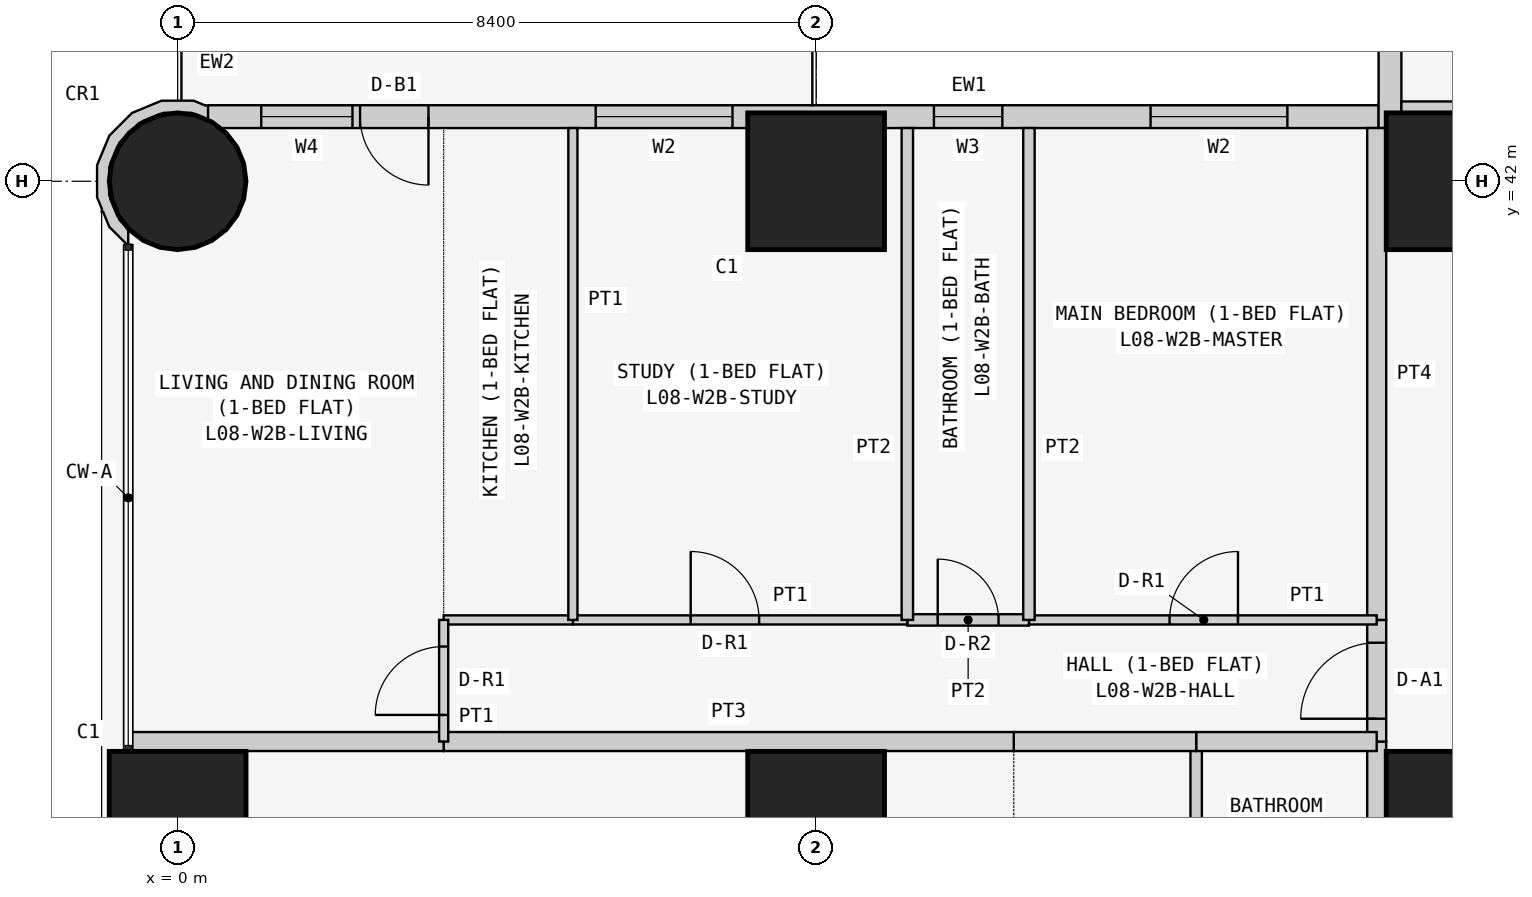
"""IFC4 building model, lengths in metres.
Left out: names, types, materials, properties, quantities, classifications, styles, units other than length and angle.
Written with IfcOpenShell. Run it as: python <this file> out.ifc"""

import sys

from ifc_helpers import new_model, si_unit, direction, frame, frame_2d, origin, origin_2d, place, context, subcontext, project, spatial, polyline, rectangle, circle, outline, extrude, element, fill, save


model = new_model("IFC4")
c1 = context("Model", 3, precision=1e-05, world=origin(), true_north=direction((0.0, 1.0)))
c2 = subcontext(c1, "Body", "Model", "MODEL_VIEW")
j1 = project(units=[si_unit("LENGTHUNIT", "METRE"), si_unit("PLANEANGLEUNIT", "RADIAN")], contexts=[c1])
p1 = place(None, origin())
s1 = spatial("IfcSite", under=j1, at=p1, CompositionType="ELEMENT")
p2 = place(p1, origin())
s2 = spatial("IfcBuilding", under=s1, at=p2, CompositionType="ELEMENT")
p3 = place(p2, frame((0.0, 0.0, 38.1)))
s3 = spatial("IfcBuildingStorey", under=s2, at=p3, CompositionType="ELEMENT", Elevation=38.1)
p4 = place(p3, frame((0.0, 33.6, 0.0), z_axis=(0.0, 0.0, 1.0), x_axis=(1.0, 0.0, 0.0)))
e1 = element("IfcColumn", 1, at=p4, inside=s3, PredefinedType="COLUMN", context=c2, shape_type="SweptSolid", body=[
    extrude(rectangle(XDim=1.8, YDim=1.8, at=origin_2d()), origin(), (0.0, 0.0, 1.0), 3.6),
])
p5 = place(p3, frame((0.0, 42.0, 0.0), z_axis=(0.0, 0.0, 1.0), x_axis=(1.0, 0.0, 0.0)))
e2 = element("IfcColumn", 2, at=p5, inside=s3, PredefinedType="COLUMN", context=c2, shape_type="SweptSolid", body=[
    extrude(circle(Radius=0.9, at=origin_2d()), origin(), (0.0, 0.0, 1.0), 3.6),
])
for number, where, z_axis, x_axis in (
    (3, (8.4, 33.6, 0.0), (0.0, 0.0, 1.0), (1.0, 0.0, 0.0)),
    (4, (8.4, 42.0, 0.0), (0.0, 0.0, 1.0), (1.0, 0.0, 0.0)),
    (5, (16.8, 33.6, 0.0), (0.0, 0.0, 1.0), (1.0, 0.0, 0.0)),
    (6, (16.8, 42.0, 0.0), (0.0, 0.0, 1.0), (1.0, 0.0, 0.0)),
):
    element("IfcColumn", number, at=place(p3, frame(where, z_axis=z_axis, x_axis=x_axis)), inside=s3, PredefinedType="COLUMN", context=c2, shape_type="SweptSolid", body=[
        extrude(rectangle(XDim=1.8, YDim=1.8, at=origin_2d()), origin(), (0.0, 0.0, 1.0), 3.6),
    ])
p6 = place(p3, frame((15.8, 42.85, 0.0), z_axis=(0.0, 0.0, 1.0), x_axis=(-1.0, 0.0, 0.0)))
e7 = element("IfcWall", 7, at=p6, inside=s3, PredefinedType="SOLIDWALL", context=c2, shape_type="SweptSolid", body=[
    extrude(rectangle(XDim=15.4, YDim=0.3, at=frame_2d((7.7, 0.0))), origin(), (0.0, 0.0, 1.0), 3.45),
])
p7 = place(p6, frame((1.2, 0.0, 0.9)))
e8 = element("IfcOpeningElement", 8, at=p7, cuts=e7, PredefinedType="OPENING", context=c2, shape_type="SweptSolid", body=[
    extrude(rectangle(XDim=1.8, YDim=1.5, at=frame_2d((0.9, 0.75))), frame((0.0, 0.16, 0.0), z_axis=(0.0, -1.0, 0.0), x_axis=(1.0, 0.0, 0.0)), (0.0, 0.0, 1.0), 0.32),
])
p8 = place(p6, frame((4.95, 0.0, 1.5)))
e9 = element("IfcOpeningElement", 9, at=p8, cuts=e7, PredefinedType="OPENING", context=c2, shape_type="SweptSolid", body=[
    extrude(rectangle(XDim=0.9, YDim=0.7, at=frame_2d((0.45, 0.35))), frame((0.0, 0.16, 0.0), z_axis=(0.0, -1.0, 0.0), x_axis=(1.0, 0.0, 0.0)), (0.0, 0.0, 1.0), 0.32),
])
p9 = place(p6, frame((8.5, 0.0, 0.9)))
e10 = element("IfcOpeningElement", 10, at=p9, cuts=e7, PredefinedType="OPENING", context=c2, shape_type="SweptSolid", body=[
    extrude(rectangle(XDim=1.8, YDim=1.5, at=frame_2d((0.9, 0.75))), frame((0.0, 0.16, 0.0), z_axis=(0.0, -1.0, 0.0), x_axis=(1.0, 0.0, 0.0)), (0.0, 0.0, 1.0), 0.32),
])
p10 = place(p6, frame((12.5, 0.0, 0.0)))
e11 = element("IfcOpeningElement", 11, at=p10, cuts=e7, PredefinedType="OPENING", context=c2, shape_type="SweptSolid", body=[
    extrude(rectangle(XDim=0.9, YDim=2.4, at=frame_2d((0.45, 1.2))), frame((0.0, 0.16, 0.0), z_axis=(0.0, -1.0, 0.0), x_axis=(1.0, 0.0, 0.0)), (0.0, 0.0, 1.0), 0.32),
])
p11 = place(p6, frame((13.5, 0.0, 0.9)))
e12 = element("IfcOpeningElement", 12, at=p11, cuts=e7, PredefinedType="OPENING", context=c2, shape_type="SweptSolid", body=[
    extrude(rectangle(XDim=1.2, YDim=1.5, at=frame_2d((0.6, 0.75))), frame((0.0, 0.16, 0.0), z_axis=(0.0, -1.0, 0.0), x_axis=(1.0, 0.0, 0.0)), (0.0, 0.0, 1.0), 0.32),
])
p12 = place(p3, frame((15.95, 58.4, 0.0), z_axis=(0.0, 0.0, 1.0), x_axis=(0.0, -1.0, 0.0)))
e13 = element("IfcWall", 13, at=p12, inside=s3, PredefinedType="SOLIDWALL", context=c2, shape_type="SweptSolid", body=[
    extrude(rectangle(XDim=15.7, YDim=0.3, at=frame_2d((7.85, 0.0))), origin(), (0.0, 0.0, 1.0), 3.45),
])
p13 = place(p12, frame((12.4, 0.0, 0.9)))
e14 = element("IfcOpeningElement", 14, at=p13, cuts=e13, PredefinedType="OPENING", context=c2, shape_type="SweptSolid", body=[
    extrude(rectangle(XDim=1.8, YDim=1.5, at=frame_2d((0.9, 0.75))), frame((0.0, 0.16, 0.0), z_axis=(0.0, -1.0, 0.0), x_axis=(1.0, 0.0, 0.0)), (0.0, 0.0, 1.0), 0.32),
])
p14 = place(p12, frame((9.55, 0.0, 1.5)))
e15 = element("IfcOpeningElement", 15, at=p14, cuts=e13, PredefinedType="OPENING", context=c2, shape_type="SweptSolid", body=[
    extrude(rectangle(XDim=0.9, YDim=0.7, at=frame_2d((0.45, 0.35))), frame((0.0, 0.16, 0.0), z_axis=(0.0, -1.0, 0.0), x_axis=(1.0, 0.0, 0.0)), (0.0, 0.0, 1.0), 0.32),
])
p15 = place(p12, frame((5.1, 0.0, 0.9)))
e16 = element("IfcOpeningElement", 16, at=p15, cuts=e13, PredefinedType="OPENING", context=c2, shape_type="SweptSolid", body=[
    extrude(rectangle(XDim=1.8, YDim=1.5, at=frame_2d((0.9, 0.75))), frame((0.0, 0.16, 0.0), z_axis=(0.0, -1.0, 0.0), x_axis=(1.0, 0.0, 0.0)), (0.0, 0.0, 1.0), 0.32),
])
p16 = place(p12, frame((2.0, 0.0, 0.0)))
e17 = element("IfcOpeningElement", 17, at=p16, cuts=e13, PredefinedType="OPENING", context=c2, shape_type="SweptSolid", body=[
    extrude(rectangle(XDim=0.9, YDim=2.4, at=frame_2d((0.45, 1.2))), frame((0.0, 0.16, 0.0), z_axis=(0.0, -1.0, 0.0), x_axis=(1.0, 0.0, 0.0)), (0.0, 0.0, 1.0), 0.32),
])
p17 = place(p12, frame((0.7, 0.0, 0.9)))
e18 = element("IfcOpeningElement", 18, at=p17, cuts=e13, PredefinedType="OPENING", context=c2, shape_type="SweptSolid", body=[
    extrude(rectangle(XDim=1.2, YDim=1.5, at=frame_2d((0.6, 0.75))), frame((0.0, 0.16, 0.0), z_axis=(0.0, -1.0, 0.0), x_axis=(1.0, 0.0, 0.0)), (0.0, 0.0, 1.0), 0.32),
])
p18 = place(p3, frame((0.364, 42.91, 0.0), z_axis=(0.0, 0.0, 1.0), x_axis=(-0.926129809145, 0.377204953059, 0.0)))
e19 = element("IfcWall", 19, at=p18, inside=s3, PredefinedType="SOLIDWALL", context=c2, shape_type="SweptSolid", body=[
    extrude(outline(polyline([(0.36, 1.803), (0.509, 1.741), (0.761, 1.486), (0.896, 1.154), (0.894, 0.795), (0.755, 0.465), (0.5, 0.213), (0.168, 0.078), (-0.1, 0.08), (0.001, -0.097), (0.03, -0.08), (0.199, -0.081), (0.589, 0.078), (0.889, 0.374), (1.053, 0.763), (1.055, 1.185), (0.896, 1.575), (0.778, 1.695), (0.769, 1.728), (0.75, 1.723), (0.6, 1.875), (0.295, 2.003), (0.281, 1.998), (0.36, 1.803)])), origin(), (0.0, 0.0, 1.0), 3.45),
])
p19 = place(p3, frame((16.1, 42.975, 0.0), z_axis=(0.0, 0.0, 1.0), x_axis=(1.0, 0.0, 0.0)))
e20 = element("IfcWall", 20, at=p19, inside=s3, PredefinedType="PARTITIONING", context=c2, shape_type="SweptSolid", body=[
    extrude(rectangle(XDim=11.557, YDim=0.15, at=frame_2d((5.778, 0.0))), origin(), (0.0, 0.0, 1.0), 3.45),
])
p20 = place(p3, frame((15.775, 32.0, 0.0), z_axis=(0.0, 0.0, 1.0), x_axis=(0.0, 1.0, 0.0)))
e21 = element("IfcWall", 21, at=p20, inside=s3, PredefinedType="PARTITIONING", context=c2, shape_type="SweptSolid", body=[
    extrude(rectangle(XDim=2.629, YDim=0.25, at=frame_2d((1.314, 0.0))), origin(), (0.0, 0.0, 1.0), 3.45),
])
p21 = place(p3, frame((15.775, 34.629, 0.0), z_axis=(0.0, 0.0, 1.0), x_axis=(0.0, 1.0, 0.0)))
e22 = element("IfcWall", 22, at=p21, inside=s3, PredefinedType="PARTITIONING", context=c2, shape_type="SweptSolid", body=[
    extrude(rectangle(XDim=1.6, YDim=0.25, at=frame_2d((0.8, 0.0))), origin(), (0.0, 0.0, 1.0), 3.45),
])
p22 = place(p21, frame((0.3, 0.0, 0.0)))
e23 = element("IfcOpeningElement", 23, at=p22, cuts=e22, PredefinedType="OPENING", context=c2, shape_type="SweptSolid", body=[
    extrude(rectangle(XDim=1.0, YDim=2.1, at=frame_2d((0.5, 1.05))), frame((0.0, 0.135, 0.0), z_axis=(0.0, -1.0, 0.0), x_axis=(1.0, 0.0, 0.0)), (0.0, 0.0, 1.0), 0.27),
])
p23 = place(p3, frame((15.775, 36.229, 0.0), z_axis=(0.0, 0.0, 1.0), x_axis=(0.0, 1.0, 0.0)))
e24 = element("IfcWall", 24, at=p23, inside=s3, PredefinedType="PARTITIONING", context=c2, shape_type="SweptSolid", body=[
    extrude(rectangle(XDim=6.471, YDim=0.25, at=frame_2d((3.235, 0.0))), origin(), (0.0, 0.0, 1.0), 3.45),
])
p24 = place(p3, frame((13.4, 32.0, 0.0), z_axis=(0.0, 0.0, 1.0), x_axis=(0.0, 1.0, 0.0)))
e25 = element("IfcWall", 25, at=p24, inside=s3, PredefinedType="PARTITIONING", context=c2, shape_type="SweptSolid", body=[
    extrude(rectangle(XDim=2.629, YDim=0.15, at=frame_2d((1.314, 0.0))), origin(), (0.0, 0.0, 1.0), 3.45),
])
p25 = place(p3, frame((13.4, 34.629, 0.0), z_axis=(0.0, 0.0, 1.0), x_axis=(1.0, 0.0, 0.0)))
e26 = element("IfcWall", 26, at=p25, inside=s3, PredefinedType="PARTITIONING", context=c2, shape_type="SweptSolid", body=[
    extrude(rectangle(XDim=2.375, YDim=0.25, at=frame_2d((1.188, 0.0))), origin(), (0.0, 0.0, 1.0), 3.45),
])
p26 = place(p3, frame((11.0, 34.629, 0.0), z_axis=(0.0, 0.0, 1.0), x_axis=(1.0, 0.0, 0.0)))
e27 = element("IfcWall", 27, at=p26, inside=s3, PredefinedType="PARTITIONING", context=c2, shape_type="SweptSolid", body=[
    extrude(rectangle(XDim=2.4, YDim=0.25, at=frame_2d((1.2, 0.0))), origin(), (0.0, 0.0, 1.0), 3.45),
])
p27 = place(p3, frame((3.5, 34.629, 0.0), z_axis=(0.0, 0.0, 1.0), x_axis=(1.0, 0.0, 0.0)))
e28 = element("IfcWall", 28, at=p27, inside=s3, PredefinedType="PARTITIONING", context=c2, shape_type="SweptSolid", body=[
    extrude(rectangle(XDim=7.5, YDim=0.25, at=frame_2d((3.75, 0.0))), origin(), (0.0, 0.0, 1.0), 3.45),
])
p28 = place(p3, frame((-0.65, 34.629, 0.0), z_axis=(0.0, 0.0, 1.0), x_axis=(1.0, 0.0, 0.0)))
e29 = element("IfcWall", 29, at=p28, inside=s3, PredefinedType="PARTITIONING", context=c2, shape_type="SweptSolid", body=[
    extrude(rectangle(XDim=4.15, YDim=0.25, at=frame_2d((2.075, 0.0))), origin(), (0.0, 0.0, 1.0), 3.45),
])
p29 = place(p3, frame((11.2, 36.229, 0.0), z_axis=(0.0, 0.0, 1.0), x_axis=(1.0, 0.0, 0.0)))
e30 = element("IfcWall", 30, at=p29, inside=s3, PredefinedType="PARTITIONING", context=c2, shape_type="SweptSolid", body=[
    extrude(rectangle(XDim=4.575, YDim=0.12, at=frame_2d((2.288, 0.0))), origin(), (0.0, 0.0, 1.0), 3.45),
])
p30 = place(p29, frame((1.85, 0.0, 0.0)))
e31 = element("IfcOpeningElement", 31, at=p30, cuts=e30, PredefinedType="OPENING", context=c2, shape_type="SweptSolid", body=[
    extrude(rectangle(XDim=0.9, YDim=2.1, at=frame_2d((0.45, 1.05))), frame((0.0, 0.07, 0.0), z_axis=(0.0, -1.0, 0.0), x_axis=(1.0, 0.0, 0.0)), (0.0, 0.0, 1.0), 0.14),
])
p31 = place(p3, frame((9.6, 36.229, 0.0), z_axis=(0.0, 0.0, 1.0), x_axis=(1.0, 0.0, 0.0)))
e32 = element("IfcWall", 32, at=p31, inside=s3, PredefinedType="PARTITIONING", context=c2, shape_type="SweptSolid", body=[
    extrude(rectangle(XDim=1.6, YDim=0.15, at=frame_2d((0.8, 0.0))), origin(), (0.0, 0.0, 1.0), 3.45),
])
p32 = place(p31, frame((0.4, 0.0, 0.0)))
e33 = element("IfcOpeningElement", 33, at=p32, cuts=e32, PredefinedType="OPENING", context=c2, shape_type="SweptSolid", body=[
    extrude(rectangle(XDim=0.8, YDim=2.1, at=frame_2d((0.4, 1.05))), frame((0.0, 0.085, 0.0), z_axis=(0.0, -1.0, 0.0), x_axis=(1.0, 0.0, 0.0)), (0.0, 0.0, 1.0), 0.17),
])
p33 = place(p3, frame((5.2, 36.229, 0.0), z_axis=(0.0, 0.0, 1.0), x_axis=(1.0, 0.0, 0.0)))
e34 = element("IfcWall", 34, at=p33, inside=s3, PredefinedType="PARTITIONING", context=c2, shape_type="SweptSolid", body=[
    extrude(rectangle(XDim=4.4, YDim=0.12, at=frame_2d((2.2, 0.0))), origin(), (0.0, 0.0, 1.0), 3.45),
])
p34 = place(p33, frame((1.55, 0.0, 0.0)))
e35 = element("IfcOpeningElement", 35, at=p34, cuts=e34, PredefinedType="OPENING", context=c2, shape_type="SweptSolid", body=[
    extrude(rectangle(XDim=0.9, YDim=2.1, at=frame_2d((0.45, 1.05))), frame((0.0, 0.07, 0.0), z_axis=(0.0, -1.0, 0.0), x_axis=(1.0, 0.0, 0.0)), (0.0, 0.0, 1.0), 0.14),
])
p35 = place(p3, frame((3.5, 36.229, 0.0), z_axis=(0.0, 0.0, 1.0), x_axis=(1.0, 0.0, 0.0)))
e36 = element("IfcWall", 36, at=p35, inside=s3, PredefinedType="PARTITIONING", context=c2, shape_type="SweptSolid", body=[
    extrude(rectangle(XDim=1.7, YDim=0.12, at=frame_2d((0.85, 0.0))), origin(), (0.0, 0.0, 1.0), 3.45),
])
p36 = place(p3, frame((3.5, 34.629, 0.0), z_axis=(0.0, 0.0, 1.0), x_axis=(0.0, 1.0, 0.0)))
e37 = element("IfcWall", 37, at=p36, inside=s3, PredefinedType="PARTITIONING", context=c2, shape_type="SweptSolid", body=[
    extrude(rectangle(XDim=1.6, YDim=0.12, at=frame_2d((0.8, 0.0))), origin(), (0.0, 0.0, 1.0), 3.45),
])
p37 = place(p36, frame((0.35, 0.0, 0.0)))
e38 = element("IfcOpeningElement", 38, at=p37, cuts=e37, PredefinedType="OPENING", context=c2, shape_type="SweptSolid", body=[
    extrude(rectangle(XDim=0.9, YDim=2.1, at=frame_2d((0.45, 1.05))), frame((0.0, 0.07, 0.0), z_axis=(0.0, -1.0, 0.0), x_axis=(1.0, 0.0, 0.0)), (0.0, 0.0, 1.0), 0.14),
])
for number, where, z_axis, x_axis in (
    (39, (11.2, 36.229, 0.0), (0.0, 0.0, 1.0), (0.0, 1.0, 0.0)),
    (40, (9.6, 36.229, 0.0), (0.0, 0.0, 1.0), (0.0, 1.0, 0.0)),
):
    element("IfcWall", number, at=place(p3, frame(where, z_axis=z_axis, x_axis=x_axis)), inside=s3, PredefinedType="PARTITIONING", context=c2, shape_type="SweptSolid", body=[
        extrude(rectangle(XDim=6.471, YDim=0.15, at=frame_2d((3.235, 0.0))), origin(), (0.0, 0.0, 1.0), 3.45),
    ])
p38 = place(p3, frame((5.2, 36.229, 0.0), z_axis=(0.0, 0.0, 1.0), x_axis=(0.0, 1.0, 0.0)))
e41 = element("IfcWall", 41, at=p38, inside=s3, PredefinedType="PARTITIONING", context=c2, shape_type="SweptSolid", body=[
    extrude(rectangle(XDim=6.471, YDim=0.12, at=frame_2d((3.235, 0.0))), origin(), (0.0, 0.0, 1.0), 3.45),
])
p39 = place(p7, origin())
e42 = element("IfcWindow", 42, at=p39, inside=s3, PartitioningType="SINGLE_PANEL", PredefinedType="WINDOW", context=c2, shape_type="SweptSolid", body=[
    extrude(rectangle(XDim=1.8, YDim=1.5, at=frame_2d((0.9, 0.75))), frame((0.0, 0.03, 0.0), z_axis=(0.0, -1.0, 0.0), x_axis=(1.0, 0.0, 0.0)), (0.0, 0.0, 1.0), 0.06),
])
fill(e8, e42)
p40 = place(p8, origin())
e43 = element("IfcWindow", 43, at=p40, inside=s3, PartitioningType="SINGLE_PANEL", PredefinedType="WINDOW", context=c2, shape_type="SweptSolid", body=[
    extrude(rectangle(XDim=0.9, YDim=0.7, at=frame_2d((0.45, 0.35))), frame((0.0, 0.03, 0.0), z_axis=(0.0, -1.0, 0.0), x_axis=(1.0, 0.0, 0.0)), (0.0, 0.0, 1.0), 0.06),
])
fill(e9, e43)
p41 = place(p9, origin())
e44 = element("IfcWindow", 44, at=p41, inside=s3, PartitioningType="SINGLE_PANEL", PredefinedType="WINDOW", context=c2, shape_type="SweptSolid", body=[
    extrude(rectangle(XDim=1.8, YDim=1.5, at=frame_2d((0.9, 0.75))), frame((0.0, 0.03, 0.0), z_axis=(0.0, -1.0, 0.0), x_axis=(1.0, 0.0, 0.0)), (0.0, 0.0, 1.0), 0.06),
])
fill(e10, e44)
p42 = place(p10, origin())
e45 = element("IfcDoor", 45, at=p42, inside=s3, OperationType="SINGLE_SWING_LEFT", PredefinedType="DOOR", context=c2, shape_type="SweptSolid", body=[
    extrude(rectangle(XDim=0.9, YDim=2.4, at=frame_2d((0.45, 1.2))), frame((0.0, 0.025, 0.0), z_axis=(0.0, -1.0, 0.0), x_axis=(1.0, 0.0, 0.0)), (0.0, 0.0, 1.0), 0.05),
])
fill(e11, e45)
p43 = place(p11, origin())
e46 = element("IfcWindow", 46, at=p43, inside=s3, PartitioningType="SINGLE_PANEL", PredefinedType="WINDOW", context=c2, shape_type="SweptSolid", body=[
    extrude(rectangle(XDim=1.2, YDim=1.5, at=frame_2d((0.6, 0.75))), frame((0.0, 0.03, 0.0), z_axis=(0.0, -1.0, 0.0), x_axis=(1.0, 0.0, 0.0)), (0.0, 0.0, 1.0), 0.06),
])
fill(e12, e46)
p44 = place(p22, origin())
e47 = element("IfcDoor", 47, at=p44, inside=s3, OperationType="SINGLE_SWING_LEFT", PredefinedType="DOOR", context=c2, shape_type="SweptSolid", body=[
    extrude(rectangle(XDim=1.0, YDim=2.1, at=frame_2d((0.5, 1.05))), frame((0.0, 0.025, 0.0), z_axis=(0.0, -1.0, 0.0), x_axis=(1.0, 0.0, 0.0)), (0.0, 0.0, 1.0), 0.05),
])
fill(e23, e47)
p45 = place(p30, origin())
e48 = element("IfcDoor", 48, at=p45, inside=s3, OperationType="SINGLE_SWING_RIGHT", PredefinedType="DOOR", context=c2, shape_type="SweptSolid", body=[
    extrude(rectangle(XDim=0.9, YDim=2.1, at=frame_2d((0.45, 1.05))), frame((0.0, 0.025, 0.0), z_axis=(0.0, -1.0, 0.0), x_axis=(1.0, 0.0, 0.0)), (0.0, 0.0, 1.0), 0.05),
])
fill(e31, e48)
p46 = place(p32, origin())
e49 = element("IfcDoor", 49, at=p46, inside=s3, OperationType="SINGLE_SWING_LEFT", PredefinedType="DOOR", context=c2, shape_type="SweptSolid", body=[
    extrude(rectangle(XDim=0.8, YDim=2.1, at=frame_2d((0.4, 1.05))), frame((0.0, 0.025, 0.0), z_axis=(0.0, -1.0, 0.0), x_axis=(1.0, 0.0, 0.0)), (0.0, 0.0, 1.0), 0.05),
])
fill(e33, e49)
p47 = place(p34, origin())
e50 = element("IfcDoor", 50, at=p47, inside=s3, OperationType="SINGLE_SWING_LEFT", PredefinedType="DOOR", context=c2, shape_type="SweptSolid", body=[
    extrude(rectangle(XDim=0.9, YDim=2.1, at=frame_2d((0.45, 1.05))), frame((0.0, 0.025, 0.0), z_axis=(0.0, -1.0, 0.0), x_axis=(1.0, 0.0, 0.0)), (0.0, 0.0, 1.0), 0.05),
])
fill(e35, e50)
p48 = place(p37, origin())
e51 = element("IfcDoor", 51, at=p48, inside=s3, OperationType="SINGLE_SWING_LEFT", PredefinedType="DOOR", context=c2, shape_type="SweptSolid", body=[
    extrude(rectangle(XDim=0.9, YDim=2.1, at=frame_2d((0.45, 1.05))), frame((0.0, 0.025, 0.0), z_axis=(0.0, -1.0, 0.0), x_axis=(1.0, 0.0, 0.0)), (0.0, 0.0, 1.0), 0.05),
])
fill(e38, e51)
save(model, sys.argv[1])
